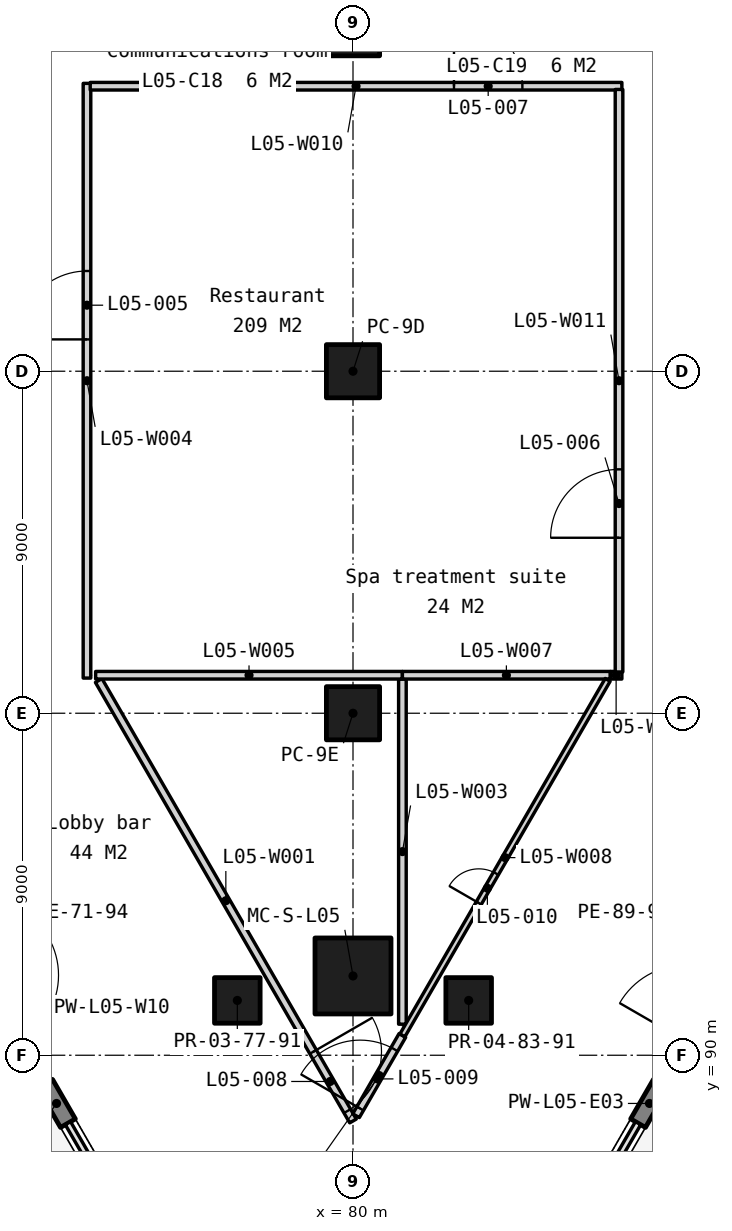
"""IFC4 building model, lengths in metres.
Left out: names, types, materials, properties, quantities, classifications, styles, units other than length and angle.
Written with IfcOpenShell. Run it as: python <this file> out.ifc"""

import sys

from ifc_helpers import new_model, si_unit, direction, frame, frame_2d, origin, origin_2d, place, context, subcontext, project, spatial, rectangle, extrude, element, fill, save


model = new_model("IFC4")
c1 = context("Model", 3, precision=1e-05, world=origin(), true_north=direction((0.0, 1.0)))
c2 = subcontext(c1, "Body", "Model", "MODEL_VIEW")
j1 = project(units=[si_unit("LENGTHUNIT", "METRE"), si_unit("PLANEANGLEUNIT", "RADIAN")], contexts=[c1])
p1 = place(None, origin())
s1 = spatial("IfcSite", under=j1, at=p1, CompositionType="ELEMENT")
p2 = place(p1, origin())
s2 = spatial("IfcBuilding", under=s1, at=p2, CompositionType="ELEMENT")
p3 = place(p2, frame((0.0, 0.0, 30.0)))
s3 = spatial("IfcBuildingStorey", under=s2, at=p3, CompositionType="ELEMENT", Elevation=30.0)
for number, where, z_axis, x_axis in (
    (1, (80.0, 117.0, 0.0), (0.0, 0.0, 1.0), (1.0, 0.0, 0.0)),
    (2, (80.0, 108.0, 0.0), (0.0, 0.0, 1.0), (1.0, 0.0, 0.0)),
    (3, (80.0, 99.0, 0.0), (0.0, 0.0, 1.0), (1.0, 0.0, 0.0)),
):
    element("IfcColumn", number, at=place(p3, frame(where, z_axis=z_axis, x_axis=x_axis)), inside=s3, PredefinedType="COLUMN", context=c2, shape_type="SweptSolid", body=[
        extrude(rectangle(XDim=1.4, YDim=1.4, at=origin_2d()), origin(), (0.0, 0.0, 1.0), 5.0),
    ])
for number, where, z_axis, x_axis in (
    (4, (76.956, 91.442, 0.0), (0.0, 0.0, 1.0), (1.0, 0.0, 0.0)),
    (5, (83.044, 91.442, 0.0), (0.0, 0.0, 1.0), (1.0, 0.0, 0.0)),
):
    element("IfcColumn", number, at=place(p3, frame(where, z_axis=z_axis, x_axis=x_axis)), inside=s3, PredefinedType="COLUMN", context=c2, shape_type="SweptSolid", body=[
        extrude(rectangle(XDim=1.2, YDim=1.2, at=origin_2d()), origin(), (0.0, 0.0, 1.0), 5.0),
    ])
p4 = place(p3, frame((80.0, 92.086, 0.0), z_axis=(0.0, 0.0, 1.0), x_axis=(1.0, 0.0, 0.0)))
e6 = element("IfcColumn", 6, at=p4, inside=s3, PredefinedType="COLUMN", context=c2, shape_type="SweptSolid", body=[
    extrude(rectangle(XDim=2.0, YDim=2.0, at=origin_2d()), origin(), (0.0, 0.0, 1.0), 5.0),
])
for number, where, z_axis, x_axis in (
    (7, (71.899, 89.251, -0.3), (0.0, 0.0, 1.0), (0.5, -0.866, 0.0)),
    (8, (87.501, 88.212, -0.3), (0.0, 0.0, 1.0), (0.5, 0.866, 0.0)),
):
    element("IfcWall", number, at=place(p3, frame(where, z_axis=z_axis, x_axis=x_axis)), inside=s3, PredefinedType="SOLIDWALL", context=c2, shape_type="SweptSolid", body=[
        extrude(rectangle(XDim=1.2, YDim=0.45, at=frame_2d((0.6, 0.0))), origin(), (0.0, 0.0, 1.0), 4.413),
    ])
for number, where, z_axis, x_axis in (
    (9, (115.981, 129.091, 0.0), (0.0, 0.0, 1.0), (-0.5, -0.866, 0.0)),
    (10, (77.166, 71.679, 0.0), (0.0, 0.0, 1.0), (-0.5, 0.866, 0.0)),
):
    element("IfcWall", number, at=place(p3, frame(where, z_axis=z_axis, x_axis=x_axis)), inside=s3, PredefinedType="STANDARD", context=c2, shape_type="SweptSolid", body=[
        extrude(rectangle(XDim=66.294, YDim=1.0, at=frame_2d((33.147, 0.0))), origin(), (0.0, 0.0, 1.0), 0.6),
    ])
p5 = place(p3, frame((73.308, 99.861, 0.0), z_axis=(0.0, 0.0, 1.0), x_axis=(0.499996150425, -0.866027626326, 0.0)))
e11 = element("IfcWall", 11, at=p5, inside=s3, PredefinedType="PARTITIONING", context=c2, shape_type="SweptSolid", body=[
    extrude(rectangle(XDim=13.384, YDim=0.2, at=frame_2d((6.692, 0.0))), origin(), (0.0, 0.0, 1.0), 4.8),
])
p6 = place(p5, frame((11.284, 0.0, 0.0)))
e12 = element("IfcOpeningElement", 12, at=p6, cuts=e11, PredefinedType="OPENING", context=c2, shape_type="SweptSolid", body=[
    extrude(rectangle(XDim=1.8, YDim=2.1, at=frame_2d((0.9, 1.05))), frame((0.0, 0.11, 0.0), z_axis=(0.0, -1.0, 0.0), x_axis=(1.0, 0.0, 0.0)), (0.0, 0.0, 1.0), 0.22),
])
p7 = place(p3, frame((80.08, 88.409, 0.0), z_axis=(0.0, 0.0, 1.0), x_axis=(0.500034220881, 0.866005645448, 0.0)))
e13 = element("IfcWall", 13, at=p7, inside=s3, PredefinedType="PARTITIONING", context=c2, shape_type="SweptSolid", body=[
    extrude(rectangle(XDim=2.44, YDim=0.2, at=frame_2d((1.22, 0.0))), origin(), (0.0, 0.0, 1.0), 4.8),
])
p8 = place(p7, frame((0.218, 0.0, 0.0)))
e14 = element("IfcOpeningElement", 14, at=p8, cuts=e13, PredefinedType="OPENING", context=c2, shape_type="SweptSolid", body=[
    extrude(rectangle(XDim=1.8, YDim=2.1, at=frame_2d((0.9, 1.05))), frame((0.0, 0.11, 0.0), z_axis=(0.0, -1.0, 0.0), x_axis=(1.0, 0.0, 0.0)), (0.0, 0.0, 1.0), 0.22),
])
p9 = place(p3, frame((81.3, 90.817, 0.0), z_axis=(0.0, 0.0, 1.0), x_axis=(0.0, 1.0, 0.0)))
e15 = element("IfcWall", 15, at=p9, inside=s3, PredefinedType="PARTITIONING", context=c2, shape_type="SweptSolid", body=[
    extrude(rectangle(XDim=9.083, YDim=0.2, at=frame_2d((4.542, 0.0))), origin(), (0.0, 0.0, 1.0), 4.8),
])
p10 = place(p3, frame((73.0, 99.925, 0.0), z_axis=(0.0, 0.0, 1.0), x_axis=(0.0, 1.0, 0.0)))
e16 = element("IfcWall", 16, at=p10, inside=s3, PredefinedType="PARTITIONING", context=c2, shape_type="SweptSolid", body=[
    extrude(rectangle(XDim=15.65, YDim=0.2, at=frame_2d((7.825, 0.0))), origin(), (0.0, 0.0, 1.0), 4.8),
])
p11 = place(p10, frame((8.913, 0.0, 0.0)))
e17 = element("IfcOpeningElement", 17, at=p11, cuts=e16, PredefinedType="OPENING", context=c2, shape_type="SweptSolid", body=[
    extrude(rectangle(XDim=1.8, YDim=2.1, at=frame_2d((0.9, 1.05))), frame((0.0, 0.11, 0.0), z_axis=(0.0, -1.0, 0.0), x_axis=(1.0, 0.0, 0.0)), (0.0, 0.0, 1.0), 0.22),
])
p12 = place(p3, frame((73.228, 100.0, 0.0), z_axis=(0.0, 0.0, 1.0), x_axis=(1.0, 0.0, 0.0)))
e18 = element("IfcWall", 18, at=p12, inside=s3, PredefinedType="PARTITIONING", context=c2, shape_type="SweptSolid", body=[
    extrude(rectangle(XDim=8.072, YDim=0.2, at=frame_2d((4.036, 0.0))), origin(), (0.0, 0.0, 1.0), 4.8),
])
p13 = place(p3, frame((81.3, 100.0, 0.0), z_axis=(0.0, 0.0, 1.0), x_axis=(1.0, 0.0, 0.0)))
e19 = element("IfcWall", 19, at=p13, inside=s3, PredefinedType="PARTITIONING", context=c2, shape_type="SweptSolid", body=[
    extrude(rectangle(XDim=5.472, YDim=0.2, at=frame_2d((2.736, 0.0))), origin(), (0.0, 0.0, 1.0), 4.8),
])
p14 = place(p3, frame((81.3, 90.522, 0.0), z_axis=(0.0, 0.0, 1.0), x_axis=(0.499993700073, 0.866029041019, 0.0)))
e20 = element("IfcWall", 20, at=p14, inside=s3, PredefinedType="PARTITIONING", context=c2, shape_type="SweptSolid", body=[
    extrude(rectangle(XDim=10.804, YDim=0.15, at=frame_2d((5.402, 0.0))), origin(), (0.0, 0.0, 1.0), 4.8),
])
p15 = place(p14, frame((4.022, 0.0, 0.0)))
e21 = element("IfcOpeningElement", 21, at=p15, cuts=e20, PredefinedType="OPENING", context=c2, shape_type="SweptSolid", body=[
    extrude(rectangle(XDim=0.9, YDim=2.1, at=frame_2d((0.45, 1.05))), frame((0.0, 0.085, 0.0), z_axis=(0.0, -1.0, 0.0), x_axis=(1.0, 0.0, 0.0)), (0.0, 0.0, 1.0), 0.17),
])
p16 = place(p3, frame((86.772, 100.0, 0.0), z_axis=(0.0, 0.0, 1.0), x_axis=(1.0, 0.0, 0.0)))
e22 = element("IfcWall", 22, at=p16, inside=s3, PredefinedType="PARTITIONING", context=c2, shape_type="SweptSolid", body=[
    extrude(rectangle(XDim=0.303, YDim=0.2, at=frame_2d((0.151, 0.0))), origin(), (0.0, 0.0, 1.0), 4.8),
])
p17 = place(p3, frame((73.085, 115.5, 0.0), z_axis=(0.0, 0.0, 1.0), x_axis=(1.0, 0.0, 0.0)))
e23 = element("IfcWall", 23, at=p17, inside=s3, PredefinedType="PARTITIONING", context=c2, shape_type="SweptSolid", body=[
    extrude(rectangle(XDim=13.99, YDim=0.2, at=frame_2d((6.995, 0.0))), origin(), (0.0, 0.0, 1.0), 4.8),
])
p18 = place(p17, frame((9.572, 0.0, 0.0)))
e24 = element("IfcOpeningElement", 24, at=p18, cuts=e23, PredefinedType="OPENING", context=c2, shape_type="SweptSolid", body=[
    extrude(rectangle(XDim=1.8, YDim=2.1, at=frame_2d((0.9, 1.05))), frame((0.0, 0.11, 0.0), z_axis=(0.0, -1.0, 0.0), x_axis=(1.0, 0.0, 0.0)), (0.0, 0.0, 1.0), 0.22),
])
p19 = place(p3, frame((87.0, 100.085, 0.0), z_axis=(0.0, 0.0, 1.0), x_axis=(0.0, 1.0, 0.0)))
e25 = element("IfcWall", 25, at=p19, inside=s3, PredefinedType="PARTITIONING", context=c2, shape_type="SweptSolid", body=[
    extrude(rectangle(XDim=15.33, YDim=0.2, at=frame_2d((7.665, 0.0))), origin(), (0.0, 0.0, 1.0), 4.8),
])
p20 = place(p19, frame((3.532, 0.0, 0.0)))
e26 = element("IfcOpeningElement", 26, at=p20, cuts=e25, PredefinedType="OPENING", context=c2, shape_type="SweptSolid", body=[
    extrude(rectangle(XDim=1.8, YDim=2.1, at=frame_2d((0.9, 1.05))), frame((0.0, 0.11, 0.0), z_axis=(0.0, -1.0, 0.0), x_axis=(1.0, 0.0, 0.0)), (0.0, 0.0, 1.0), 0.22),
])
p21 = place(p11, origin())
e27 = element("IfcDoor", 27, at=p21, inside=s3, OperationType="SINGLE_SWING_LEFT", PredefinedType="DOOR", context=c2, shape_type="SweptSolid", body=[
    extrude(rectangle(XDim=1.8, YDim=2.1, at=frame_2d((0.9, 1.05))), frame((0.0, 0.025, 0.0), z_axis=(0.0, -1.0, 0.0), x_axis=(1.0, 0.0, 0.0)), (0.0, 0.0, 1.0), 0.05),
])
fill(e17, e27)
p22 = place(p20, origin())
e28 = element("IfcDoor", 28, at=p22, inside=s3, OperationType="SINGLE_SWING_LEFT", PredefinedType="DOOR", context=c2, shape_type="SweptSolid", body=[
    extrude(rectangle(XDim=1.8, YDim=2.1, at=frame_2d((0.9, 1.05))), frame((0.0, 0.025, 0.0), z_axis=(0.0, -1.0, 0.0), x_axis=(1.0, 0.0, 0.0)), (0.0, 0.0, 1.0), 0.05),
])
fill(e26, e28)
p23 = place(p18, origin())
e29 = element("IfcDoor", 29, at=p23, inside=s3, OperationType="SINGLE_SWING_LEFT", PredefinedType="DOOR", context=c2, shape_type="SweptSolid", body=[
    extrude(rectangle(XDim=1.8, YDim=2.1, at=frame_2d((0.9, 1.05))), frame((0.0, 0.025, 0.0), z_axis=(0.0, -1.0, 0.0), x_axis=(1.0, 0.0, 0.0)), (0.0, 0.0, 1.0), 0.05),
])
fill(e24, e29)
p24 = place(p6, origin())
e30 = element("IfcDoor", 30, at=p24, inside=s3, OperationType="SINGLE_SWING_LEFT", PredefinedType="DOOR", context=c2, shape_type="SweptSolid", body=[
    extrude(rectangle(XDim=1.8, YDim=2.1, at=frame_2d((0.9, 1.05))), frame((0.0, 0.025, 0.0), z_axis=(0.0, -1.0, 0.0), x_axis=(1.0, 0.0, 0.0)), (0.0, 0.0, 1.0), 0.05),
])
fill(e12, e30)
p25 = place(p8, origin())
e31 = element("IfcDoor", 31, at=p25, inside=s3, OperationType="SINGLE_SWING_LEFT", PredefinedType="DOOR", context=c2, shape_type="SweptSolid", body=[
    extrude(rectangle(XDim=1.8, YDim=2.1, at=frame_2d((0.9, 1.05))), frame((0.0, 0.025, 0.0), z_axis=(0.0, -1.0, 0.0), x_axis=(1.0, 0.0, 0.0)), (0.0, 0.0, 1.0), 0.05),
])
fill(e14, e31)
p26 = place(p15, origin())
e32 = element("IfcDoor", 32, at=p26, inside=s3, OperationType="SINGLE_SWING_LEFT", PredefinedType="DOOR", context=c2, shape_type="SweptSolid", body=[
    extrude(rectangle(XDim=0.9, YDim=2.1, at=frame_2d((0.45, 1.05))), frame((0.0, 0.025, 0.0), z_axis=(0.0, -1.0, 0.0), x_axis=(1.0, 0.0, 0.0)), (0.0, 0.0, 1.0), 0.05),
])
fill(e21, e32)
save(model, sys.argv[1])
